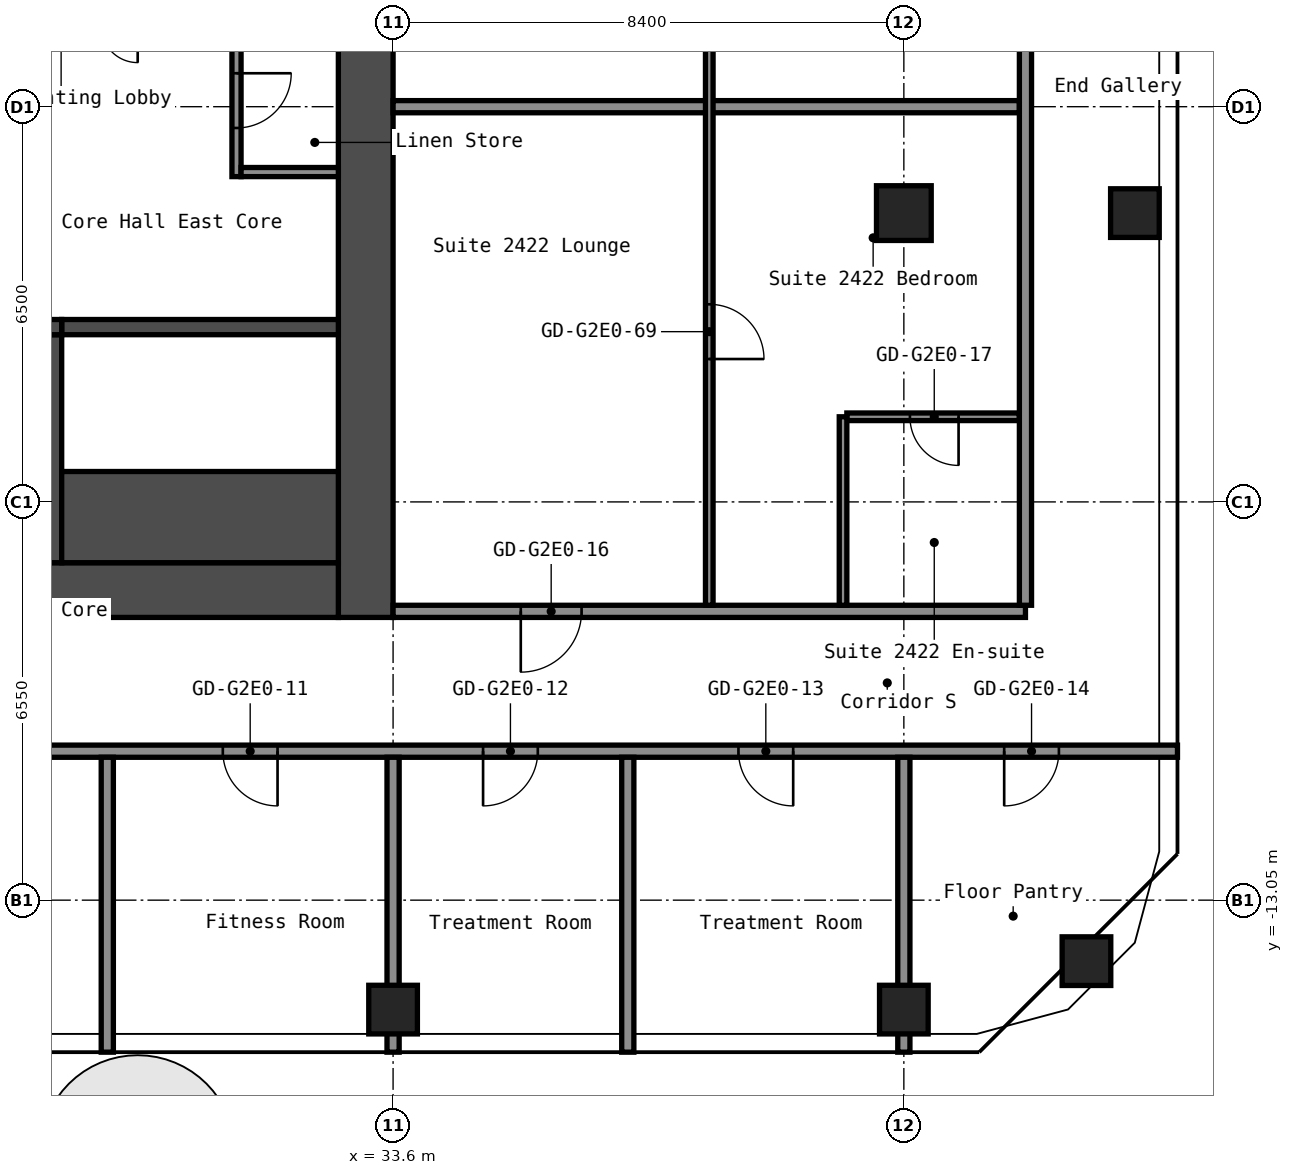
"""IFC4 building model, lengths in metres.
Left out: names, types, materials, properties, quantities, classifications, styles, units other than length and angle.
Written with IfcOpenShell. Run it as: python <this file> out.ifc"""

import sys

from ifc_helpers import new_model, si_unit, direction, frame, frame_2d, origin, origin_2d, place, context, subcontext, project, spatial, rectangle, hollow_rectangle, extrude, element, fill, save


model = new_model("IFC4")
c1 = context("Model", 3, precision=1e-05, world=origin(), true_north=direction((0.0, 1.0)))
c2 = subcontext(c1, "Body", "Model", "MODEL_VIEW")
j1 = project(units=[si_unit("LENGTHUNIT", "METRE"), si_unit("PLANEANGLEUNIT", "RADIAN")], contexts=[c1])
p1 = place(None, origin())
s1 = spatial("IfcSite", under=j1, at=p1, CompositionType="ELEMENT")
p2 = place(p1, origin())
s2 = spatial("IfcBuilding", under=s1, at=p2, CompositionType="ELEMENT")
p3 = place(p2, frame((0.0, 0.0, 88.2)))
s3 = spatial("IfcBuildingStorey", under=s2, at=p3, CompositionType="ELEMENT", Elevation=88.2)
for number, where, z_axis, x_axis in (
    (1, (33.6, -14.85, 0.0), (0.0, 0.0, 1.0), (1.0, 0.0, 0.0)),
    (2, (42.0, -14.85, 0.0), (0.0, 0.0, 1.0), (1.0, 0.0, 0.0)),
):
    element("IfcColumn", number, at=place(p3, frame(where, z_axis=z_axis, x_axis=x_axis)), inside=s3, PredefinedType="COLUMN", context=c2, shape_type="SweptSolid", body=[
        extrude(hollow_rectangle(XDim=0.8, YDim=0.8, WallThickness=0.032, at=origin_2d()), origin(), (0.0, 0.0, 1.0), 2.8),
    ])
p4 = place(p3, frame((42.0, -1.75, 0.0), z_axis=(0.0, 0.0, 1.0), x_axis=(1.0, 0.0, 0.0)))
e3 = element("IfcColumn", 3, at=p4, inside=s3, PredefinedType="COLUMN", context=c2, shape_type="SweptSolid", body=[
    extrude(hollow_rectangle(XDim=0.9, YDim=0.9, WallThickness=0.036, at=origin_2d()), origin(), (0.0, 0.0, 1.0), 2.8),
])
for number, where, z_axis, x_axis in (
    (4, (45.003, -14.053, 0.0), (0.0, 0.0, 1.0), (1.0, 0.0, 0.0)),
    (5, (45.8, -1.75, 0.0), (0.0, 0.0, 1.0), (1.0, 0.0, 0.0)),
):
    element("IfcColumn", number, at=place(p3, frame(where, z_axis=z_axis, x_axis=x_axis)), inside=s3, PredefinedType="COLUMN", context=c2, shape_type="SweptSolid", body=[
        extrude(hollow_rectangle(XDim=0.8, YDim=0.8, WallThickness=0.032, at=origin_2d()), origin(), (0.0, 0.0, 1.0), 2.8),
    ])
p5 = place(p3, frame((33.15, -8.4, 0.0), z_axis=(0.0, 0.0, 1.0), x_axis=(0.0, 1.0, 0.0)))
e6 = element("IfcWall", 6, at=p5, inside=s3, PredefinedType="SHEAR", context=c2, shape_type="SweptSolid", body=[
    extrude(rectangle(XDim=16.8, YDim=0.9, at=frame_2d((8.4, 0.0))), origin(), (0.0, 0.0, 1.0), 2.8),
])
p6 = place(p3, frame((17.7, -7.95, 0.0), z_axis=(0.0, 0.0, 1.0), x_axis=(1.0, 0.0, 0.0)))
e7 = element("IfcWall", 7, at=p6, inside=s3, PredefinedType="SHEAR", context=c2, shape_type="SweptSolid", body=[
    extrude(rectangle(XDim=15.0, YDim=0.9, at=frame_2d((7.5, 0.0))), origin(), (0.0, 0.0, 1.0), 2.8),
])
p7 = place(p6, frame((2.55, 0.0, 0.0)))
e8 = element("IfcOpeningElement", 8, at=p7, cuts=e7, PredefinedType="OPENING", context=c2, shape_type="SweptSolid", body=[
    extrude(rectangle(XDim=1.0, YDim=2.1, at=frame_2d((0.5, 1.05))), frame((0.0, 0.46, 0.0), z_axis=(0.0, -1.0, 0.0), x_axis=(1.0, 0.0, 0.0)), (0.0, 0.0, 1.0), 0.92),
])
p8 = place(p3, frame((27.9, -7.5, 0.0), z_axis=(0.0, 0.0, 1.0), x_axis=(0.0, 1.0, 0.0)))
e9 = element("IfcWall", 9, at=p8, inside=s3, PredefinedType="SHEAR", context=c2, shape_type="SweptSolid", body=[
    extrude(rectangle(XDim=3.75, YDim=0.5, at=frame_2d((1.875, 0.0))), origin(), (0.0, 0.0, 1.0), 2.8),
])
p9 = place(p3, frame((28.15, -3.625, 0.0), z_axis=(0.0, 0.0, 1.0), x_axis=(1.0, 0.0, 0.0)))
e10 = element("IfcWall", 10, at=p9, inside=s3, PredefinedType="SHEAR", context=c2, shape_type="SweptSolid", body=[
    extrude(rectangle(XDim=4.55, YDim=0.25, at=frame_2d((2.275, 0.0))), origin(), (0.0, 0.0, 1.0), 2.8),
])
p10 = place(p3, frame((28.15, -6.75, 0.0), z_axis=(0.0, 0.0, 1.0), x_axis=(1.0, 0.0, 0.0)))
e11 = element("IfcWall", 11, at=p10, inside=s3, PredefinedType="SHEAR", context=c2, shape_type="SweptSolid", body=[
    extrude(rectangle(XDim=4.55, YDim=1.5, at=frame_2d((2.275, 0.0))), origin(), (0.0, 0.0, 1.0), 2.8),
])
p11 = place(p3, frame((27.65, -3.625, 0.0), z_axis=(0.0, 0.0, 1.0), x_axis=(1.0, 0.0, 0.0)))
e12 = element("IfcWall", 12, at=p11, inside=s3, PredefinedType="SHEAR", context=c2, shape_type="SweptSolid", body=[
    extrude(rectangle(XDim=0.5, YDim=0.25, at=frame_2d((0.25, 0.0))), origin(), (0.0, 0.0, 1.0), 2.8),
])
p12 = place(p3, frame((31.025, -1.15, 0.0), z_axis=(0.0, 0.0, 1.0), x_axis=(0.0, 1.0, 0.0)))
e13 = element("IfcWall", 13, at=p12, inside=s3, PredefinedType="PARTITIONING", context=c2, shape_type="SweptSolid", body=[
    extrude(rectangle(XDim=2.35, YDim=0.15, at=frame_2d((1.175, 0.0))), origin(), (0.0, 0.0, 1.0), 2.8),
])
p13 = place(p12, frame((0.8, 0.0, 0.0)))
e14 = element("IfcOpeningElement", 14, at=p13, cuts=e13, PredefinedType="OPENING", context=c2, shape_type="SweptSolid", body=[
    extrude(rectangle(XDim=0.9, YDim=2.1, at=frame_2d((0.45, 1.05))), frame((0.0, 0.085, 0.0), z_axis=(0.0, -1.0, 0.0), x_axis=(1.0, 0.0, 0.0)), (0.0, 0.0, 1.0), 0.17),
])
p14 = place(p3, frame((31.1, -1.075, 0.0), z_axis=(0.0, 0.0, 1.0), x_axis=(1.0, 0.0, 0.0)))
e15 = element("IfcWall", 15, at=p14, inside=s3, PredefinedType="PARTITIONING", context=c2, shape_type="SweptSolid", body=[
    extrude(rectangle(XDim=1.6, YDim=0.15, at=frame_2d((0.8, 0.0))), origin(), (0.0, 0.0, 1.0), 2.8),
])
p15 = place(p3, frame((16.8, -10.6, 0.0), z_axis=(0.0, 0.0, 1.0), x_axis=(1.0, 0.0, 0.0)))
e16 = element("IfcWall", 16, at=p15, inside=s3, PredefinedType="PARTITIONING", context=c2, shape_type="SweptSolid", body=[
    extrude(rectangle(XDim=29.7, YDim=0.2, at=frame_2d((14.85, 0.0))), origin(), (0.0, 0.0, 1.0), 2.8),
])
p16 = place(p15, frame((1.315, 0.0, 0.0)))
e17 = element("IfcOpeningElement", 17, at=p16, cuts=e16, PredefinedType="OPENING", context=c2, shape_type="SweptSolid", body=[
    extrude(rectangle(XDim=0.9, YDim=2.1, at=frame_2d((0.45, 1.05))), frame((0.0, 0.11, 0.0), z_axis=(0.0, -1.0, 0.0), x_axis=(1.0, 0.0, 0.0)), (0.0, 0.0, 1.0), 0.22),
])
p17 = place(p15, frame((5.515, 0.0, 0.0)))
e18 = element("IfcOpeningElement", 18, at=p17, cuts=e16, PredefinedType="OPENING", context=c2, shape_type="SweptSolid", body=[
    extrude(rectangle(XDim=0.9, YDim=2.1, at=frame_2d((0.45, 1.05))), frame((0.0, 0.11, 0.0), z_axis=(0.0, -1.0, 0.0), x_axis=(1.0, 0.0, 0.0)), (0.0, 0.0, 1.0), 0.22),
])
p18 = place(p15, frame((9.8, 0.0, 0.0)))
e19 = element("IfcOpeningElement", 19, at=p18, cuts=e16, PredefinedType="OPENING", context=c2, shape_type="SweptSolid", body=[
    extrude(rectangle(XDim=0.9, YDim=2.1, at=frame_2d((0.45, 1.05))), frame((0.0, 0.11, 0.0), z_axis=(0.0, -1.0, 0.0), x_axis=(1.0, 0.0, 0.0)), (0.0, 0.0, 1.0), 0.22),
])
p19 = place(p15, frame((14.0, 0.0, 0.0)))
e20 = element("IfcOpeningElement", 20, at=p19, cuts=e16, PredefinedType="OPENING", context=c2, shape_type="SweptSolid", body=[
    extrude(rectangle(XDim=0.9, YDim=2.1, at=frame_2d((0.45, 1.05))), frame((0.0, 0.11, 0.0), z_axis=(0.0, -1.0, 0.0), x_axis=(1.0, 0.0, 0.0)), (0.0, 0.0, 1.0), 0.22),
])
p20 = place(p15, frame((18.28, 0.0, 0.0)))
e21 = element("IfcOpeningElement", 21, at=p20, cuts=e16, PredefinedType="OPENING", context=c2, shape_type="SweptSolid", body=[
    extrude(rectangle(XDim=0.9, YDim=2.1, at=frame_2d((0.45, 1.05))), frame((0.0, 0.11, 0.0), z_axis=(0.0, -1.0, 0.0), x_axis=(1.0, 0.0, 0.0)), (0.0, 0.0, 1.0), 0.22),
])
p21 = place(p15, frame((22.48, 0.0, 0.0)))
e22 = element("IfcOpeningElement", 22, at=p21, cuts=e16, PredefinedType="OPENING", context=c2, shape_type="SweptSolid", body=[
    extrude(rectangle(XDim=0.9, YDim=2.1, at=frame_2d((0.45, 1.05))), frame((0.0, 0.11, 0.0), z_axis=(0.0, -1.0, 0.0), x_axis=(1.0, 0.0, 0.0)), (0.0, 0.0, 1.0), 0.22),
])
p22 = place(p15, frame((26.85, 0.0, 0.0)))
e23 = element("IfcOpeningElement", 23, at=p22, cuts=e16, PredefinedType="OPENING", context=c2, shape_type="SweptSolid", body=[
    extrude(rectangle(XDim=0.9, YDim=2.1, at=frame_2d((0.45, 1.05))), frame((0.0, 0.11, 0.0), z_axis=(0.0, -1.0, 0.0), x_axis=(1.0, 0.0, 0.0)), (0.0, 0.0, 1.0), 0.22),
])
p23 = place(p3, frame((33.6, -8.3, 0.0), z_axis=(0.0, 0.0, 1.0), x_axis=(1.0, 0.0, 0.0)))
e24 = element("IfcWall", 24, at=p23, inside=s3, PredefinedType="PARTITIONING", context=c2, shape_type="SweptSolid", body=[
    extrude(rectangle(XDim=10.4, YDim=0.2, at=frame_2d((5.2, 0.0))), origin(), (0.0, 0.0, 1.0), 2.8),
])
p24 = place(p23, frame((2.1, 0.0, 0.0)))
e25 = element("IfcOpeningElement", 25, at=p24, cuts=e24, PredefinedType="OPENING", context=c2, shape_type="SweptSolid", body=[
    extrude(rectangle(XDim=1.0, YDim=2.1, at=frame_2d((0.5, 1.05))), frame((0.0, 0.11, 0.0), z_axis=(0.0, -1.0, 0.0), x_axis=(1.0, 0.0, 0.0)), (0.0, 0.0, 1.0), 0.22),
])
p25 = place(p3, frame((41.062, -5.1, 0.0), z_axis=(0.0, 0.0, 1.0), x_axis=(1.0, 0.0, 0.0)))
e26 = element("IfcWall", 26, at=p25, inside=s3, PredefinedType="PARTITIONING", context=c2, shape_type="SweptSolid", body=[
    extrude(rectangle(XDim=2.837, YDim=0.125, at=frame_2d((1.419, 0.0))), origin(), (0.0, 0.0, 1.0), 2.8),
])
p26 = place(p25, frame((1.038, 0.0, 0.0)))
e27 = element("IfcOpeningElement", 27, at=p26, cuts=e26, PredefinedType="OPENING", context=c2, shape_type="SweptSolid", body=[
    extrude(rectangle(XDim=0.8, YDim=2.1, at=frame_2d((0.4, 1.05))), frame((0.0, 0.073, 0.0), z_axis=(0.0, -1.0, 0.0), x_axis=(1.0, 0.0, 0.0)), (0.0, 0.0, 1.0), 0.145),
])
p27 = place(p3, frame((33.6, 0.0, 0.0), z_axis=(0.0, 0.0, 1.0), x_axis=(1.0, 0.0, 0.0)))
e28 = element("IfcWall", 28, at=p27, inside=s3, PredefinedType="PARTITIONING", context=c2, shape_type="SweptSolid", body=[
    extrude(rectangle(XDim=10.3, YDim=0.2, at=frame_2d((5.15, 0.0))), origin(), (0.0, 0.0, 1.0), 2.8),
])
for number, where, z_axis, x_axis in (
    (29, (28.9, -15.55, 0.0), (0.0, 0.0, 1.0), (0.0, 1.0, 0.0)),
    (30, (33.6, -15.55, 0.0), (0.0, 0.0, 1.0), (0.0, 1.0, 0.0)),
    (31, (37.46, -15.55, 0.0), (0.0, 0.0, 1.0), (0.0, 1.0, 0.0)),
):
    element("IfcWall", number, at=place(p3, frame(where, z_axis=z_axis, x_axis=x_axis)), inside=s3, PredefinedType="PARTITIONING", context=c2, shape_type="SweptSolid", body=[
        extrude(rectangle(XDim=4.85, YDim=0.2, at=frame_2d((2.425, 0.0))), origin(), (0.0, 0.0, 1.0), 2.8),
    ])
p28 = place(p3, frame((38.8, -8.2, 0.0), z_axis=(0.0, 0.0, 1.0), x_axis=(0.0, 1.0, 0.0)))
e32 = element("IfcWall", 32, at=p28, inside=s3, PredefinedType="PARTITIONING", context=c2, shape_type="SweptSolid", body=[
    extrude(rectangle(XDim=16.4, YDim=0.125, at=frame_2d((8.2, 0.0))), origin(), (0.0, 0.0, 1.0), 2.8),
])
p29 = place(p28, frame((4.05, 0.0, 0.0)))
e33 = element("IfcOpeningElement", 33, at=p29, cuts=e32, PredefinedType="OPENING", context=c2, shape_type="SweptSolid", body=[
    extrude(rectangle(XDim=0.9, YDim=2.1, at=frame_2d((0.45, 1.05))), frame((0.0, 0.073, 0.0), z_axis=(0.0, -1.0, 0.0), x_axis=(1.0, 0.0, 0.0)), (0.0, 0.0, 1.0), 0.145),
])
p30 = place(p28, frame((11.45, 0.0, 0.0)))
e34 = element("IfcOpeningElement", 34, at=p30, cuts=e32, PredefinedType="OPENING", context=c2, shape_type="SweptSolid", body=[
    extrude(rectangle(XDim=0.9, YDim=2.1, at=frame_2d((0.45, 1.05))), frame((0.0, 0.073, 0.0), z_axis=(0.0, -1.0, 0.0), x_axis=(1.0, 0.0, 0.0)), (0.0, 0.0, 1.0), 0.145),
])
p31 = place(p3, frame((41.0, -8.2, 0.0), z_axis=(0.0, 0.0, 1.0), x_axis=(0.0, 1.0, 0.0)))
e35 = element("IfcWall", 35, at=p31, inside=s3, PredefinedType="PARTITIONING", context=c2, shape_type="SweptSolid", body=[
    extrude(rectangle(XDim=3.1, YDim=0.125, at=frame_2d((1.55, 0.0))), origin(), (0.0, 0.0, 1.0), 2.8),
])
p32 = place(p3, frame((42.0, -15.55, 0.0), z_axis=(0.0, 0.0, 1.0), x_axis=(0.0, 1.0, 0.0)))
e36 = element("IfcWall", 36, at=p32, inside=s3, PredefinedType="PARTITIONING", context=c2, shape_type="SweptSolid", body=[
    extrude(rectangle(XDim=4.85, YDim=0.2, at=frame_2d((2.425, 0.0))), origin(), (0.0, 0.0, 1.0), 2.8),
])
p33 = place(p3, frame((44.0, -8.2, 0.0), z_axis=(0.0, 0.0, 1.0), x_axis=(0.0, 1.0, 0.0)))
e37 = element("IfcWall", 37, at=p33, inside=s3, PredefinedType="PARTITIONING", context=c2, shape_type="SweptSolid", body=[
    extrude(rectangle(XDim=16.4, YDim=0.2, at=frame_2d((8.2, 0.0))), origin(), (0.0, 0.0, 1.0), 2.8),
])
p34 = place(p13, origin())
e38 = element("IfcDoor", 38, at=p34, inside=s3, OperationType="SINGLE_SWING_RIGHT", PredefinedType="DOOR", context=c2, shape_type="SweptSolid", body=[
    extrude(rectangle(XDim=0.9, YDim=2.1, at=frame_2d((0.45, 1.05))), frame((0.0, 0.025, 0.0), z_axis=(0.0, -1.0, 0.0), x_axis=(1.0, 0.0, 0.0)), (0.0, 0.0, 1.0), 0.05),
])
fill(e14, e38)
p35 = place(p19, origin())
e39 = element("IfcDoor", 39, at=p35, inside=s3, OperationType="SINGLE_SWING_RIGHT", PredefinedType="DOOR", context=c2, shape_type="SweptSolid", body=[
    extrude(rectangle(XDim=0.9, YDim=2.1, at=frame_2d((0.45, 1.05))), frame((0.0, 0.025, 0.0), z_axis=(0.0, -1.0, 0.0), x_axis=(1.0, 0.0, 0.0)), (0.0, 0.0, 1.0), 0.05),
])
fill(e20, e39)
p36 = place(p20, origin())
e40 = element("IfcDoor", 40, at=p36, inside=s3, OperationType="SINGLE_SWING_LEFT", PredefinedType="DOOR", context=c2, shape_type="SweptSolid", body=[
    extrude(rectangle(XDim=0.9, YDim=2.1, at=frame_2d((0.45, 1.05))), frame((0.0, 0.025, 0.0), z_axis=(0.0, -1.0, 0.0), x_axis=(1.0, 0.0, 0.0)), (0.0, 0.0, 1.0), 0.05),
])
fill(e21, e40)
p37 = place(p21, origin())
e41 = element("IfcDoor", 41, at=p37, inside=s3, OperationType="SINGLE_SWING_RIGHT", PredefinedType="DOOR", context=c2, shape_type="SweptSolid", body=[
    extrude(rectangle(XDim=0.9, YDim=2.1, at=frame_2d((0.45, 1.05))), frame((0.0, 0.025, 0.0), z_axis=(0.0, -1.0, 0.0), x_axis=(1.0, 0.0, 0.0)), (0.0, 0.0, 1.0), 0.05),
])
fill(e22, e41)
p38 = place(p22, origin())
e42 = element("IfcDoor", 42, at=p38, inside=s3, OperationType="SINGLE_SWING_LEFT", PredefinedType="DOOR", context=c2, shape_type="SweptSolid", body=[
    extrude(rectangle(XDim=0.9, YDim=2.1, at=frame_2d((0.45, 1.05))), frame((0.0, 0.025, 0.0), z_axis=(0.0, -1.0, 0.0), x_axis=(1.0, 0.0, 0.0)), (0.0, 0.0, 1.0), 0.05),
])
fill(e23, e42)
p39 = place(p24, origin())
e43 = element("IfcDoor", 43, at=p39, inside=s3, OperationType="SINGLE_SWING_LEFT", PredefinedType="DOOR", context=c2, shape_type="SweptSolid", body=[
    extrude(rectangle(XDim=1.0, YDim=2.1, at=frame_2d((0.5, 1.05))), frame((0.0, 0.025, 0.0), z_axis=(0.0, -1.0, 0.0), x_axis=(1.0, 0.0, 0.0)), (0.0, 0.0, 1.0), 0.05),
])
fill(e25, e43)
p40 = place(p26, origin())
e44 = element("IfcDoor", 44, at=p40, inside=s3, OperationType="SINGLE_SWING_RIGHT", PredefinedType="DOOR", context=c2, shape_type="SweptSolid", body=[
    extrude(rectangle(XDim=0.8, YDim=2.1, at=frame_2d((0.4, 1.05))), frame((0.0, 0.025, 0.0), z_axis=(0.0, -1.0, 0.0), x_axis=(1.0, 0.0, 0.0)), (0.0, 0.0, 1.0), 0.05),
])
fill(e27, e44)
p41 = place(p29, origin())
e45 = element("IfcDoor", 45, at=p41, inside=s3, OperationType="SINGLE_SWING_LEFT", PredefinedType="DOOR", context=c2, shape_type="SweptSolid", body=[
    extrude(rectangle(XDim=0.9, YDim=2.1, at=frame_2d((0.45, 1.05))), frame((0.0, 0.025, 0.0), z_axis=(0.0, -1.0, 0.0), x_axis=(1.0, 0.0, 0.0)), (0.0, 0.0, 1.0), 0.05),
])
fill(e33, e45)
save(model, sys.argv[1])
